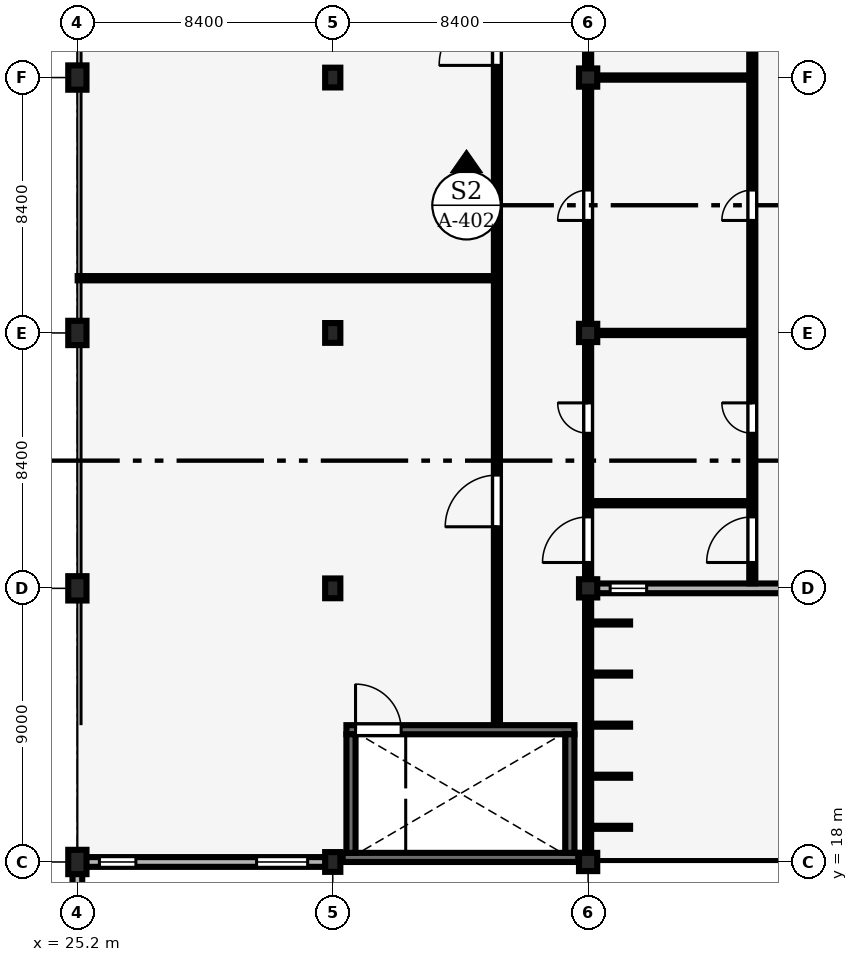
"""IFC4 building model, lengths in metres.
Left out: names, types, materials, properties, quantities, classifications, styles, units other than length and angle.
Written with IfcOpenShell. Run it as: python <this file> out.ifc"""

import sys

from ifc_helpers import new_model, si_unit, direction, frame, frame_2d, origin, origin_2d, place, context, subcontext, project, spatial, rectangle, extrude, element, fill, save


model = new_model("IFC4")
c1 = context("Model", 3, precision=1e-05, world=origin(), true_north=direction((0.0, 1.0)))
c2 = subcontext(c1, "Body", "Model", "MODEL_VIEW")
j1 = project(units=[si_unit("LENGTHUNIT", "METRE"), si_unit("PLANEANGLEUNIT", "RADIAN")], contexts=[c1])
p1 = place(None, origin())
s1 = spatial("IfcSite", under=j1, at=p1, CompositionType="ELEMENT")
p2 = place(p1, origin())
s2 = spatial("IfcBuilding", under=s1, at=p2, CompositionType="ELEMENT")
p3 = place(p2, frame((0.0, 0.0, 4.8)))
s3 = spatial("IfcBuildingStorey", under=s2, at=p3, CompositionType="ELEMENT", Elevation=4.8)
for number, where, z_axis, x_axis in (
    (1, (25.2, 18.0, 0.0), (0.0, 0.0, 1.0), (1.0, 0.0, 0.0)),
    (2, (25.2, 27.0, 0.0), (0.0, 0.0, 1.0), (1.0, 0.0, 0.0)),
    (3, (25.2, 35.4, 0.0), (0.0, 0.0, 1.0), (1.0, 0.0, 0.0)),
    (4, (25.2, 43.8, 0.0), (0.0, 0.0, 1.0), (1.0, 0.0, 0.0)),
):
    element("IfcColumn", number, at=place(p3, frame(where, z_axis=z_axis, x_axis=x_axis)), inside=s3, PredefinedType="COLUMN", context=c2, shape_type="SweptSolid", body=[
        extrude(rectangle(XDim=0.6, YDim=0.8, at=origin_2d()), origin(), (0.0, 0.0, 1.0), 4.2),
    ])
for number, where, z_axis, x_axis in (
    (5, (33.6, 18.0, 0.0), (0.0, 0.0, 1.0), (1.0, 0.0, 0.0)),
    (6, (33.6, 27.0, 0.0), (0.0, 0.0, 1.0), (1.0, 0.0, 0.0)),
    (7, (33.6, 35.4, 0.0), (0.0, 0.0, 1.0), (1.0, 0.0, 0.0)),
    (8, (33.6, 43.8, 0.0), (0.0, 0.0, 1.0), (1.0, 0.0, 0.0)),
):
    element("IfcColumn", number, at=place(p3, frame(where, z_axis=z_axis, x_axis=x_axis)), inside=s3, PredefinedType="COLUMN", context=c2, shape_type="SweptSolid", body=[
        extrude(rectangle(XDim=0.5, YDim=0.65, at=origin_2d()), origin(), (0.0, 0.0, 1.0), 4.2),
    ])
for number, where, z_axis, x_axis in (
    (9, (42.0, 18.0, 0.0), (0.0, 0.0, 1.0), (1.0, 0.0, 0.0)),
    (10, (42.0, 27.0, 0.0), (0.0, 0.0, 1.0), (1.0, 0.0, 0.0)),
    (11, (42.0, 35.4, 0.0), (0.0, 0.0, 1.0), (1.0, 0.0, 0.0)),
    (12, (42.0, 43.8, 0.0), (0.0, 0.0, 1.0), (1.0, 0.0, 0.0)),
):
    element("IfcColumn", number, at=place(p3, frame(where, z_axis=z_axis, x_axis=x_axis)), inside=s3, PredefinedType="COLUMN", context=c2, shape_type="SweptSolid", body=[
        extrude(rectangle(XDim=0.6, YDim=0.6, at=origin_2d()), origin(), (0.0, 0.0, 1.0), 4.2),
    ])
p4 = place(p3, frame((25.2, 9.375, 0.0), z_axis=(0.0, 0.0, 1.0), x_axis=(0.0, 1.0, 0.0)))
e13 = element("IfcWall", 13, at=p4, inside=s3, PredefinedType="SOLIDWALL", context=c2, shape_type="SweptSolid", body=[
    extrude(rectangle(XDim=8.25, YDim=0.32, at=frame_2d((4.125, 0.0))), origin(), (0.0, 0.0, 1.0), 3.222),
])
p5 = place(p4, frame((2.925, 0.0, 0.9)))
e14 = element("IfcOpeningElement", 14, at=p5, cuts=e13, PredefinedType="OPENING", context=c2, shape_type="SweptSolid", body=[
    extrude(rectangle(XDim=2.4, YDim=1.8, at=frame_2d((1.2, 0.9))), frame((0.0, 0.17, 0.0), z_axis=(0.0, -1.0, 0.0), x_axis=(1.0, 0.0, 0.0)), (0.0, 0.0, 1.0), 0.34),
])
p6 = place(p3, frame((25.475, 18.0, 0.0), z_axis=(0.0, 0.0, 1.0), x_axis=(1.0, 0.0, 0.0)))
e15 = element("IfcWall", 15, at=p6, inside=s3, PredefinedType="SOLIDWALL", context=c2, shape_type="SweptSolid", body=[
    extrude(rectangle(XDim=7.9, YDim=0.32, at=frame_2d((3.95, 0.0))), origin(), (0.0, 0.0, 1.0), 3.43),
])
p7 = place(p6, frame((0.45, 0.0, 0.9)))
e16 = element("IfcOpeningElement", 16, at=p7, cuts=e15, PredefinedType="OPENING", context=c2, shape_type="SweptSolid", body=[
    extrude(rectangle(XDim=1.2, YDim=1.8, at=frame_2d((0.6, 0.9))), frame((0.0, 0.17, 0.0), z_axis=(0.0, -1.0, 0.0), x_axis=(1.0, 0.0, 0.0)), (0.0, 0.0, 1.0), 0.34),
])
p8 = place(p6, frame((5.62, 0.0, 0.9)))
e17 = element("IfcOpeningElement", 17, at=p8, cuts=e15, PredefinedType="OPENING", context=c2, shape_type="SweptSolid", body=[
    extrude(rectangle(XDim=1.68, YDim=2.4, at=frame_2d((0.84, 1.2))), frame((0.0, 0.17, 0.0), z_axis=(0.0, -1.0, 0.0), x_axis=(1.0, 0.0, 0.0)), (0.0, 0.0, 1.0), 0.34),
])
p9 = place(p3, frame((42.275, 27.0, 0.0), z_axis=(0.0, 0.0, 1.0), x_axis=(1.0, 0.0, 0.0)))
e18 = element("IfcWall", 18, at=p9, inside=s3, PredefinedType="SOLIDWALL", context=c2, shape_type="SweptSolid", body=[
    extrude(rectangle(XDim=7.85, YDim=0.32, at=frame_2d((3.925, 0.0))), origin(), (0.0, 0.0, 1.0), 3.13),
])
p10 = place(p9, frame((0.45, 0.0, 0.9)))
e19 = element("IfcOpeningElement", 19, at=p10, cuts=e18, PredefinedType="OPENING", context=c2, shape_type="SweptSolid", body=[
    extrude(rectangle(XDim=1.2, YDim=1.5, at=frame_2d((0.6, 0.75))), frame((0.0, 0.17, 0.0), z_axis=(0.0, -1.0, 0.0), x_axis=(1.0, 0.0, 0.0)), (0.0, 0.0, 1.0), 0.34),
])
p11 = place(p9, frame((6.2, 0.0, 0.9)))
e20 = element("IfcOpeningElement", 20, at=p11, cuts=e18, PredefinedType="OPENING", context=c2, shape_type="SweptSolid", body=[
    extrude(rectangle(XDim=1.2, YDim=1.8, at=frame_2d((0.6, 0.9))), frame((0.0, 0.17, 0.0), z_axis=(0.0, -1.0, 0.0), x_axis=(1.0, 0.0, 0.0)), (0.0, 0.0, 1.0), 0.34),
])
p12 = place(p3, frame((33.925, 18.15, 0.0), z_axis=(0.0, 0.0, 1.0), x_axis=(1.0, 0.0, 0.0)))
e21 = element("IfcWall", 21, at=p12, inside=s3, PredefinedType="SHEAR", context=c2, shape_type="SweptSolid", body=[
    extrude(rectangle(XDim=7.75, YDim=0.3, at=frame_2d((3.875, 0.0))), origin(), (0.0, 0.0, 1.0), 4.025),
])
p13 = place(p3, frame((34.05, 22.35, 0.0), z_axis=(0.0, 0.0, 1.0), x_axis=(1.0, 0.0, 0.0)))
e22 = element("IfcWall", 22, at=p13, inside=s3, PredefinedType="SHEAR", context=c2, shape_type="SweptSolid", body=[
    extrude(rectangle(XDim=7.5, YDim=0.3, at=frame_2d((3.75, 0.0))), origin(), (0.0, 0.0, 1.0), 4.025),
])
p14 = place(p13, frame((0.3, 0.0, 0.0)))
e23 = element("IfcOpeningElement", 23, at=p14, cuts=e22, PredefinedType="OPENING", context=c2, shape_type="SweptSolid", body=[
    extrude(rectangle(XDim=1.5, YDim=2.2, at=frame_2d((0.75, 1.1))), frame((0.0, 0.16, 0.0), z_axis=(0.0, -1.0, 0.0), x_axis=(1.0, 0.0, 0.0)), (0.0, 0.0, 1.0), 0.32),
])
for number, where, z_axis, x_axis in (
    (24, (34.2, 18.3, 0.0), (0.0, 0.0, 1.0), (0.0, 1.0, 0.0)),
    (25, (41.4, 18.3, 0.0), (0.0, 0.0, 1.0), (0.0, 1.0, 0.0)),
):
    element("IfcWall", number, at=place(p3, frame(where, z_axis=z_axis, x_axis=x_axis)), inside=s3, PredefinedType="SHEAR", context=c2, shape_type="SweptSolid", body=[
        extrude(rectangle(XDim=3.9, YDim=0.3, at=frame_2d((1.95, 0.0))), origin(), (0.0, 0.0, 1.0), 4.025),
    ])
p15 = place(p3, frame((25.21, 37.2, 0.0), z_axis=(0.0, 0.0, 1.0), x_axis=(1.0, 0.0, 0.0)))
e26 = element("IfcWall", 26, at=p15, inside=s3, PredefinedType="PARTITIONING", context=c2, shape_type="SweptSolid", body=[
    extrude(rectangle(XDim=13.685, YDim=0.14, at=frame_2d((6.843, 0.0))), origin(), (0.0, 0.0, 1.0), 3.9),
])
p16 = place(p3, frame((39.0, 22.56, 0.0), z_axis=(0.0, 0.0, 1.0), x_axis=(0.0, 1.0, 0.0)))
e27 = element("IfcWall", 27, at=p16, inside=s3, PredefinedType="PARTITIONING", context=c2, shape_type="SweptSolid", body=[
    extrude(rectangle(XDim=29.535, YDim=0.2, at=frame_2d((14.768, 0.0))), origin(), (0.0, 0.0, 1.0), 3.9),
])
p17 = place(p16, frame((6.465, 0.0, 0.0)))
e28 = element("IfcOpeningElement", 28, at=p17, cuts=e27, PredefinedType="OPENING", context=c2, shape_type="SweptSolid", body=[
    extrude(rectangle(XDim=1.7, YDim=2.25, at=frame_2d((0.85, 1.125))), frame((0.0, 0.11, 0.0), z_axis=(0.0, -1.0, 0.0), x_axis=(1.0, 0.0, 0.0)), (0.0, 0.0, 1.0), 0.22),
])
p18 = place(p16, frame((21.64, 0.0, 0.0)))
e29 = element("IfcOpeningElement", 29, at=p18, cuts=e27, PredefinedType="OPENING", context=c2, shape_type="SweptSolid", body=[
    extrude(rectangle(XDim=1.9, YDim=2.4, at=frame_2d((0.95, 1.2))), frame((0.0, 0.11, 0.0), z_axis=(0.0, -1.0, 0.0), x_axis=(1.0, 0.0, 0.0)), (0.0, 0.0, 1.0), 0.22),
])
p19 = place(p3, frame((42.105, 29.8, 0.0), z_axis=(0.0, 0.0, 1.0), x_axis=(1.0, 0.0, 0.0)))
e30 = element("IfcWall", 30, at=p19, inside=s3, PredefinedType="PARTITIONING", context=c2, shape_type="SweptSolid", body=[
    extrude(rectangle(XDim=5.19, YDim=0.14, at=frame_2d((2.595, 0.0))), origin(), (0.0, 0.0, 1.0), 3.43),
])
p20 = place(p3, frame((42.105, 35.4, 0.0), z_axis=(0.0, 0.0, 1.0), x_axis=(1.0, 0.0, 0.0)))
e31 = element("IfcWall", 31, at=p20, inside=s3, PredefinedType="PARTITIONING", context=c2, shape_type="SweptSolid", body=[
    extrude(rectangle(XDim=5.19, YDim=0.14, at=frame_2d((2.595, 0.0))), origin(), (0.0, 0.0, 1.0), 3.23),
])
p21 = place(p3, frame((42.105, 43.8, 0.0), z_axis=(0.0, 0.0, 1.0), x_axis=(1.0, 0.0, 0.0)))
e32 = element("IfcWall", 32, at=p21, inside=s3, PredefinedType="PARTITIONING", context=c2, shape_type="SweptSolid", body=[
    extrude(rectangle(XDim=5.19, YDim=0.14, at=frame_2d((2.595, 0.0))), origin(), (0.0, 0.0, 1.0), 3.01),
])
p22 = place(p3, frame((47.4, 27.165, 0.0), z_axis=(0.0, 0.0, 1.0), x_axis=(0.0, 1.0, 0.0)))
e33 = element("IfcWall", 33, at=p22, inside=s3, PredefinedType="PARTITIONING", context=c2, shape_type="SweptSolid", body=[
    extrude(rectangle(XDim=58.625, YDim=0.2, at=frame_2d((29.312, 0.0))), origin(), (0.0, 0.0, 1.0), 3.9),
])
p23 = place(p22, frame((0.685, 0.0, 0.0)))
e34 = element("IfcOpeningElement", 34, at=p23, cuts=e33, PredefinedType="OPENING", context=c2, shape_type="SweptSolid", body=[
    extrude(rectangle(XDim=1.5, YDim=2.2, at=frame_2d((0.75, 1.1))), frame((0.0, 0.11, 0.0), z_axis=(0.0, -1.0, 0.0), x_axis=(1.0, 0.0, 0.0)), (0.0, 0.0, 1.0), 0.22),
])
p24 = place(p22, frame((4.935, 0.0, 0.0)))
e35 = element("IfcOpeningElement", 35, at=p24, cuts=e33, PredefinedType="OPENING", context=c2, shape_type="SweptSolid", body=[
    extrude(rectangle(XDim=1.0, YDim=2.15, at=frame_2d((0.5, 1.075))), frame((0.0, 0.11, 0.0), z_axis=(0.0, -1.0, 0.0), x_axis=(1.0, 0.0, 0.0)), (0.0, 0.0, 1.0), 0.22),
])
p25 = place(p22, frame((11.935, 0.0, 0.0)))
e36 = element("IfcOpeningElement", 36, at=p25, cuts=e33, PredefinedType="OPENING", context=c2, shape_type="SweptSolid", body=[
    extrude(rectangle(XDim=1.0, YDim=2.15, at=frame_2d((0.5, 1.075))), frame((0.0, 0.11, 0.0), z_axis=(0.0, -1.0, 0.0), x_axis=(1.0, 0.0, 0.0)), (0.0, 0.0, 1.0), 0.22),
])
p26 = place(p22, frame((20.335, 0.0, 0.0)))
e37 = element("IfcOpeningElement", 37, at=p26, cuts=e33, PredefinedType="OPENING", context=c2, shape_type="SweptSolid", body=[
    extrude(rectangle(XDim=1.0, YDim=2.15, at=frame_2d((0.5, 1.075))), frame((0.0, 0.11, 0.0), z_axis=(0.0, -1.0, 0.0), x_axis=(1.0, 0.0, 0.0)), (0.0, 0.0, 1.0), 0.22),
])
p27 = place(p22, frame((27.36, 0.0, 0.0)))
e38 = element("IfcOpeningElement", 38, at=p27, cuts=e33, PredefinedType="OPENING", context=c2, shape_type="SweptSolid", body=[
    extrude(rectangle(XDim=0.95, YDim=2.2, at=frame_2d((0.475, 1.1))), frame((0.0, 0.11, 0.0), z_axis=(0.0, -1.0, 0.0), x_axis=(1.0, 0.0, 0.0)), (0.0, 0.0, 1.0), 0.22),
])
p28 = place(p22, frame((32.96, 0.0, 0.0)))
e39 = element("IfcOpeningElement", 39, at=p28, cuts=e33, PredefinedType="OPENING", context=c2, shape_type="SweptSolid", body=[
    extrude(rectangle(XDim=0.95, YDim=2.2, at=frame_2d((0.475, 1.1))), frame((0.0, 0.11, 0.0), z_axis=(0.0, -1.0, 0.0), x_axis=(1.0, 0.0, 0.0)), (0.0, 0.0, 1.0), 0.22),
])
p29 = place(p22, frame((38.56, 0.0, 0.0)))
e40 = element("IfcOpeningElement", 40, at=p29, cuts=e33, PredefinedType="OPENING", context=c2, shape_type="SweptSolid", body=[
    extrude(rectangle(XDim=0.95, YDim=2.1, at=frame_2d((0.475, 1.05))), frame((0.0, 0.11, 0.0), z_axis=(0.0, -1.0, 0.0), x_axis=(1.0, 0.0, 0.0)), (0.0, 0.0, 1.0), 0.22),
])
p30 = place(p22, frame((45.535, 0.0, 0.0)))
e41 = element("IfcOpeningElement", 41, at=p30, cuts=e33, PredefinedType="OPENING", context=c2, shape_type="SweptSolid", body=[
    extrude(rectangle(XDim=1.0, YDim=2.15, at=frame_2d((0.5, 1.075))), frame((0.0, 0.11, 0.0), z_axis=(0.0, -1.0, 0.0), x_axis=(1.0, 0.0, 0.0)), (0.0, 0.0, 1.0), 0.22),
])
p31 = place(p22, frame((53.935, 0.0, 0.0)))
e42 = element("IfcOpeningElement", 42, at=p31, cuts=e33, PredefinedType="OPENING", context=c2, shape_type="SweptSolid", body=[
    extrude(rectangle(XDim=1.0, YDim=2.15, at=frame_2d((0.5, 1.075))), frame((0.0, 0.11, 0.0), z_axis=(0.0, -1.0, 0.0), x_axis=(1.0, 0.0, 0.0)), (0.0, 0.0, 1.0), 0.22),
])
p32 = place(p3, frame((42.0, 27.165, 0.0), z_axis=(0.0, 0.0, 1.0), x_axis=(0.0, 1.0, 0.0)))
e43 = element("IfcWall", 43, at=p32, inside=s3, PredefinedType="PARTITIONING", context=c2, shape_type="SweptSolid", body=[
    extrude(rectangle(XDim=7.925, YDim=0.2, at=frame_2d((3.962, 0.0))), origin(), (0.0, 0.0, 1.0), 3.272),
])
p33 = place(p32, frame((0.685, 0.0, 0.0)))
e44 = element("IfcOpeningElement", 44, at=p33, cuts=e43, PredefinedType="OPENING", context=c2, shape_type="SweptSolid", body=[
    extrude(rectangle(XDim=1.5, YDim=2.2, at=frame_2d((0.75, 1.1))), frame((0.0, 0.11, 0.0), z_axis=(0.0, -1.0, 0.0), x_axis=(1.0, 0.0, 0.0)), (0.0, 0.0, 1.0), 0.22),
])
p34 = place(p32, frame((4.935, 0.0, 0.0)))
e45 = element("IfcOpeningElement", 45, at=p34, cuts=e43, PredefinedType="OPENING", context=c2, shape_type="SweptSolid", body=[
    extrude(rectangle(XDim=1.0, YDim=2.15, at=frame_2d((0.5, 1.075))), frame((0.0, 0.11, 0.0), z_axis=(0.0, -1.0, 0.0), x_axis=(1.0, 0.0, 0.0)), (0.0, 0.0, 1.0), 0.22),
])
p35 = place(p3, frame((42.0, 35.71, 0.0), z_axis=(0.0, 0.0, 1.0), x_axis=(0.0, 1.0, 0.0)))
e46 = element("IfcWall", 46, at=p35, inside=s3, PredefinedType="PARTITIONING", context=c2, shape_type="SweptSolid", body=[
    extrude(rectangle(XDim=7.78, YDim=0.2, at=frame_2d((3.89, 0.0))), origin(), (0.0, 0.0, 1.0), 3.352),
])
p36 = place(p35, frame((3.39, 0.0, 0.0)))
e47 = element("IfcOpeningElement", 47, at=p36, cuts=e46, PredefinedType="OPENING", context=c2, shape_type="SweptSolid", body=[
    extrude(rectangle(XDim=1.0, YDim=2.15, at=frame_2d((0.5, 1.075))), frame((0.0, 0.11, 0.0), z_axis=(0.0, -1.0, 0.0), x_axis=(1.0, 0.0, 0.0)), (0.0, 0.0, 1.0), 0.22),
])
p37 = place(p3, frame((42.0, 44.11, 0.0), z_axis=(0.0, 0.0, 1.0), x_axis=(0.0, 1.0, 0.0)))
e48 = element("IfcWall", 48, at=p37, inside=s3, PredefinedType="PARTITIONING", context=c2, shape_type="SweptSolid", body=[
    extrude(rectangle(XDim=7.985, YDim=0.2, at=frame_2d((3.992, 0.0))), origin(), (0.0, 0.0, 1.0), 3.352),
])
p38 = place(p37, frame((3.39, 0.0, 0.0)))
e49 = element("IfcOpeningElement", 49, at=p38, cuts=e48, PredefinedType="OPENING", context=c2, shape_type="SweptSolid", body=[
    extrude(rectangle(XDim=1.0, YDim=2.15, at=frame_2d((0.5, 1.075))), frame((0.0, 0.11, 0.0), z_axis=(0.0, -1.0, 0.0), x_axis=(1.0, 0.0, 0.0)), (0.0, 0.0, 1.0), 0.22),
])
p39 = place(p7, origin())
e50 = element("IfcWindow", 50, at=p39, inside=s3, PartitioningType="SINGLE_PANEL", PredefinedType="WINDOW", context=c2, shape_type="SweptSolid", body=[
    extrude(rectangle(XDim=1.2, YDim=1.8, at=frame_2d((0.6, 0.9))), frame((0.0, 0.03, 0.0), z_axis=(0.0, -1.0, 0.0), x_axis=(1.0, 0.0, 0.0)), (0.0, 0.0, 1.0), 0.06),
])
fill(e16, e50)
p40 = place(p8, origin())
e51 = element("IfcWindow", 51, at=p40, inside=s3, PartitioningType="SINGLE_PANEL", PredefinedType="WINDOW", context=c2, shape_type="SweptSolid", body=[
    extrude(rectangle(XDim=1.68, YDim=2.4, at=frame_2d((0.84, 1.2))), frame((0.0, 0.03, 0.0), z_axis=(0.0, -1.0, 0.0), x_axis=(1.0, 0.0, 0.0)), (0.0, 0.0, 1.0), 0.06),
])
fill(e17, e51)
p41 = place(p10, origin())
e52 = element("IfcWindow", 52, at=p41, inside=s3, PartitioningType="SINGLE_PANEL", PredefinedType="WINDOW", context=c2, shape_type="SweptSolid", body=[
    extrude(rectangle(XDim=1.2, YDim=1.5, at=frame_2d((0.6, 0.75))), frame((0.0, 0.03, 0.0), z_axis=(0.0, -1.0, 0.0), x_axis=(1.0, 0.0, 0.0)), (0.0, 0.0, 1.0), 0.06),
])
fill(e19, e52)
p42 = place(p14, origin())
e53 = element("IfcDoor", 53, at=p42, inside=s3, OperationType="DOUBLE_DOOR_SINGLE_SWING", PredefinedType="DOOR", context=c2, shape_type="SweptSolid", body=[
    extrude(rectangle(XDim=1.5, YDim=2.2, at=frame_2d((0.75, 1.1))), frame((0.0, 0.025, 0.0), z_axis=(0.0, -1.0, 0.0), x_axis=(1.0, 0.0, 0.0)), (0.0, 0.0, 1.0), 0.05),
])
fill(e23, e53)
p43 = place(p17, origin())
e54 = element("IfcDoor", 54, at=p43, inside=s3, OperationType="DOUBLE_DOOR_SINGLE_SWING", PredefinedType="DOOR", context=c2, shape_type="SweptSolid", body=[
    extrude(rectangle(XDim=1.7, YDim=2.25, at=frame_2d((0.85, 1.125))), frame((0.0, 0.025, 0.0), z_axis=(0.0, -1.0, 0.0), x_axis=(1.0, 0.0, 0.0)), (0.0, 0.0, 1.0), 0.05),
])
fill(e28, e54)
p44 = place(p18, origin())
e55 = element("IfcDoor", 55, at=p44, inside=s3, OperationType="DOUBLE_DOOR_SINGLE_SWING", PredefinedType="DOOR", context=c2, shape_type="SweptSolid", body=[
    extrude(rectangle(XDim=1.9, YDim=2.4, at=frame_2d((0.95, 1.2))), frame((0.0, 0.025, 0.0), z_axis=(0.0, -1.0, 0.0), x_axis=(1.0, 0.0, 0.0)), (0.0, 0.0, 1.0), 0.05),
])
fill(e29, e55)
p45 = place(p23, origin())
e56 = element("IfcDoor", 56, at=p45, inside=s3, OperationType="DOUBLE_DOOR_SINGLE_SWING", PredefinedType="DOOR", context=c2, shape_type="SweptSolid", body=[
    extrude(rectangle(XDim=1.5, YDim=2.2, at=frame_2d((0.75, 1.1))), frame((0.0, 0.025, 0.0), z_axis=(0.0, -1.0, 0.0), x_axis=(1.0, 0.0, 0.0)), (0.0, 0.0, 1.0), 0.05),
])
fill(e34, e56)
p46 = place(p24, origin())
e57 = element("IfcDoor", 57, at=p46, inside=s3, OperationType="SINGLE_SWING_RIGHT", PredefinedType="DOOR", context=c2, shape_type="SweptSolid", body=[
    extrude(rectangle(XDim=1.0, YDim=2.15, at=frame_2d((0.5, 1.075))), frame((0.0, 0.025, 0.0), z_axis=(0.0, -1.0, 0.0), x_axis=(1.0, 0.0, 0.0)), (0.0, 0.0, 1.0), 0.05),
])
fill(e35, e57)
p47 = place(p25, origin())
e58 = element("IfcDoor", 58, at=p47, inside=s3, OperationType="SINGLE_SWING_LEFT", PredefinedType="DOOR", context=c2, shape_type="SweptSolid", body=[
    extrude(rectangle(XDim=1.0, YDim=2.15, at=frame_2d((0.5, 1.075))), frame((0.0, 0.025, 0.0), z_axis=(0.0, -1.0, 0.0), x_axis=(1.0, 0.0, 0.0)), (0.0, 0.0, 1.0), 0.05),
])
fill(e36, e58)
p48 = place(p33, origin())
e59 = element("IfcDoor", 59, at=p48, inside=s3, OperationType="DOUBLE_DOOR_SINGLE_SWING", PredefinedType="DOOR", context=c2, shape_type="SweptSolid", body=[
    extrude(rectangle(XDim=1.5, YDim=2.2, at=frame_2d((0.75, 1.1))), frame((0.0, 0.025, 0.0), z_axis=(0.0, -1.0, 0.0), x_axis=(1.0, 0.0, 0.0)), (0.0, 0.0, 1.0), 0.05),
])
fill(e44, e59)
p49 = place(p34, origin())
e60 = element("IfcDoor", 60, at=p49, inside=s3, OperationType="SINGLE_SWING_RIGHT", PredefinedType="DOOR", context=c2, shape_type="SweptSolid", body=[
    extrude(rectangle(XDim=1.0, YDim=2.15, at=frame_2d((0.5, 1.075))), frame((0.0, 0.025, 0.0), z_axis=(0.0, -1.0, 0.0), x_axis=(1.0, 0.0, 0.0)), (0.0, 0.0, 1.0), 0.05),
])
fill(e45, e60)
p50 = place(p36, origin())
e61 = element("IfcDoor", 61, at=p50, inside=s3, OperationType="SINGLE_SWING_LEFT", PredefinedType="DOOR", context=c2, shape_type="SweptSolid", body=[
    extrude(rectangle(XDim=1.0, YDim=2.15, at=frame_2d((0.5, 1.075))), frame((0.0, 0.025, 0.0), z_axis=(0.0, -1.0, 0.0), x_axis=(1.0, 0.0, 0.0)), (0.0, 0.0, 1.0), 0.05),
])
fill(e47, e61)
save(model, sys.argv[1])
